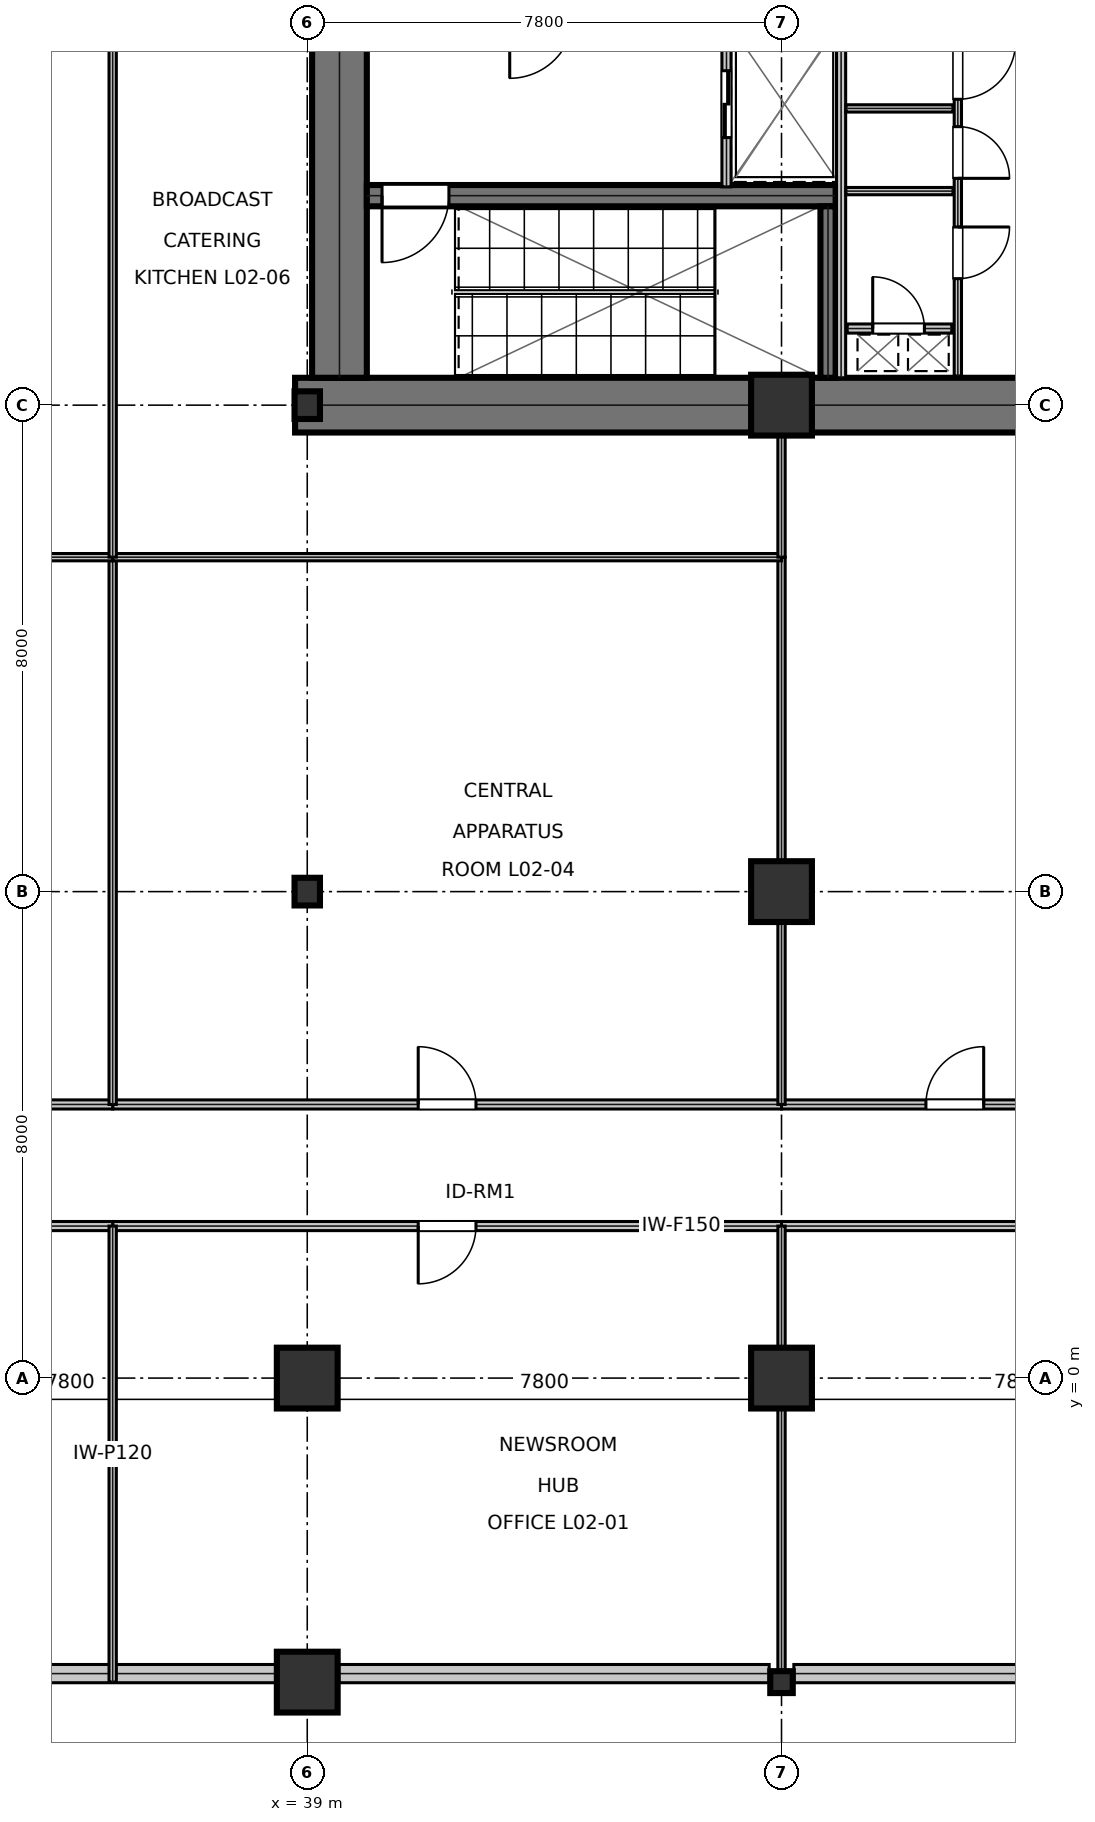
"""IFC4 building model, lengths in metres.
Left out: names, types, materials, properties, quantities, classifications, styles, units other than length and angle.
Written with IfcOpenShell. Run it as: python <this file> out.ifc"""

import sys

from ifc_helpers import new_model, si_unit, direction, frame, frame_2d, origin, origin_2d, place, context, subcontext, project, spatial, rectangle, i_section, extrude, element, fill, save


model = new_model("IFC4")
c1 = context("Model", 3, precision=1e-05, world=origin(), true_north=direction((0.0, 1.0)))
c2 = subcontext(c1, "Body", "Model", "MODEL_VIEW")
j1 = project(units=[si_unit("LENGTHUNIT", "METRE"), si_unit("PLANEANGLEUNIT", "RADIAN")], contexts=[c1])
p1 = place(None, origin())
s1 = spatial("IfcSite", under=j1, at=p1, CompositionType="ELEMENT")
p2 = place(p1, origin())
s2 = spatial("IfcBuilding", under=s1, at=p2, CompositionType="ELEMENT")
p3 = place(p2, frame((0.0, 0.0, 10.8)))
s3 = spatial("IfcBuildingStorey", under=s2, at=p3, CompositionType="ELEMENT", Elevation=10.8)
p4 = place(p3, frame((38.8, 16.0, 0.0), z_axis=(0.0, 0.0, 1.0), x_axis=(1.0, 0.0, 0.0)))
e1 = element("IfcWall", 1, at=p4, inside=s3, PredefinedType="SHEAR", context=c2, shape_type="SweptSolid", body=[
    extrude(rectangle(XDim=16.0, YDim=0.9, at=frame_2d((8.0, 0.0))), origin(), (0.0, 0.0, 1.0), 5.12),
])
p5 = place(p3, frame((39.53, 16.45, 0.0), z_axis=(0.0, 0.0, 1.0), x_axis=(0.0, 1.0, 0.0)))
e2 = element("IfcWall", 2, at=p5, inside=s3, PredefinedType="SHEAR", context=c2, shape_type="SweptSolid", body=[
    extrude(rectangle(XDim=6.15, YDim=0.9, at=frame_2d((3.075, 0.0))), origin(), (0.0, 0.0, 1.0), 5.12),
])
p6 = place(p3, frame((39.98, 19.445, 0.0), z_axis=(0.0, 0.0, 1.0), x_axis=(1.0, 0.0, 0.0)))
e3 = element("IfcWall", 3, at=p6, inside=s3, PredefinedType="SHEAR", context=c2, shape_type="SweptSolid", body=[
    extrude(rectangle(XDim=7.71, YDim=0.35, at=frame_2d((3.855, 0.0))), origin(), (0.0, 0.0, 1.0), 5.12),
])
p7 = place(p6, frame((0.25, 0.0, 0.0)))
e4 = element("IfcOpeningElement", 4, at=p7, cuts=e3, PredefinedType="OPENING", context=c2, shape_type="SweptSolid", body=[
    extrude(rectangle(XDim=1.1, YDim=2.15, at=frame_2d((0.55, 1.075))), frame((0.0, 0.185, 0.0), z_axis=(0.0, -1.0, 0.0), x_axis=(1.0, 0.0, 0.0)), (0.0, 0.0, 1.0), 0.37),
])
p8 = place(p3, frame((47.565, 16.45, 0.0), z_axis=(0.0, 0.0, 1.0), x_axis=(0.0, 1.0, 0.0)))
e5 = element("IfcWall", 5, at=p8, inside=s3, PredefinedType="SHEAR", context=c2, shape_type="SweptSolid", body=[
    extrude(rectangle(XDim=2.82, YDim=0.25, at=frame_2d((1.41, 0.0))), origin(), (0.0, 0.0, 1.0), 5.12),
])
for number, where, z_axis, x_axis in (
    (6, (39.0, -5.0, 0.0), (0.0, 0.0, 1.0), (1.0, 0.0, 0.0)),
    (7, (39.0, 0.0, 0.0), (0.0, 0.0, 1.0), (1.0, 0.0, 0.0)),
):
    element("IfcColumn", number, at=place(p3, frame(where, z_axis=z_axis, x_axis=x_axis)), inside=s3, PredefinedType="COLUMN", context=c2, shape_type="SweptSolid", body=[
        extrude(rectangle(XDim=1.0, YDim=1.0, at=origin_2d()), origin(), (0.0, 0.0, 1.0), 5.395),
    ])
for number, where, z_axis, x_axis in (
    (8, (39.0, 8.0, 0.0), (0.0, 0.0, 1.0), (1.0, 0.0, 0.0)),
    (9, (39.0, 16.0, 0.0), (0.0, 0.0, 1.0), (1.0, 0.0, 0.0)),
):
    element("IfcColumn", number, at=place(p3, frame(where, z_axis=z_axis, x_axis=x_axis)), inside=s3, PredefinedType="COLUMN", context=c2, shape_type="SweptSolid", body=[
        extrude(i_section(OverallWidth=0.418, OverallDepth=0.455, WebThickness=0.042, FlangeThickness=0.068, at=origin_2d()), origin(), (0.0, 0.0, 1.0), 5.395),
    ])
p9 = place(p3, frame((46.8, -5.0, 0.0), z_axis=(0.0, 0.0, 1.0), x_axis=(1.0, 0.0, 0.0)))
e10 = element("IfcColumn", 10, at=p9, inside=s3, PredefinedType="COLUMN", context=c2, shape_type="SweptSolid", body=[
    extrude(i_section(OverallWidth=0.37, OverallDepth=0.36, WebThickness=0.012, FlangeThickness=0.02, at=origin_2d()), origin(), (0.0, 0.0, 1.0), 5.395),
])
for number, where, z_axis, x_axis in (
    (11, (46.8, 0.0, 0.0), (0.0, 0.0, 1.0), (1.0, 0.0, 0.0)),
    (12, (46.8, 8.0, 0.0), (0.0, 0.0, 1.0), (1.0, 0.0, 0.0)),
    (13, (46.8, 16.0, 0.0), (0.0, 0.0, 1.0), (1.0, 0.0, 0.0)),
):
    element("IfcColumn", number, at=place(p3, frame(where, z_axis=z_axis, x_axis=x_axis)), inside=s3, PredefinedType="COLUMN", context=c2, shape_type="SweptSolid", body=[
        extrude(rectangle(XDim=1.0, YDim=1.0, at=origin_2d()), origin(), (0.0, 0.0, 1.0), 5.395),
    ])
p10 = place(p3, frame((31.718, -4.86, 0.0), z_axis=(0.0, 0.0, 1.0), x_axis=(1.0, 0.0, 0.0)))
e14 = element("IfcWall", 14, at=p10, inside=s3, PredefinedType="STANDARD", context=c2, shape_type="SweptSolid", body=[
    extrude(rectangle(XDim=6.764, YDim=0.3, at=frame_2d((3.382, 0.0))), origin(), (0.0, 0.0, 1.0), 4.648),
])
p11 = place(p3, frame((39.518, -4.86, 0.0), z_axis=(0.0, 0.0, 1.0), x_axis=(1.0, 0.0, 0.0)))
e15 = element("IfcWall", 15, at=p11, inside=s3, PredefinedType="STANDARD", context=c2, shape_type="SweptSolid", body=[
    extrude(rectangle(XDim=7.079, YDim=0.3, at=frame_2d((3.54, 0.0))), origin(), (0.0, 0.0, 1.0), 4.648),
])
p12 = place(p3, frame((47.003, -4.86, 0.0), z_axis=(0.0, 0.0, 1.0), x_axis=(1.0, 0.0, 0.0)))
e16 = element("IfcWall", 16, at=p12, inside=s3, PredefinedType="STANDARD", context=c2, shape_type="SweptSolid", body=[
    extrude(rectangle(XDim=7.079, YDim=0.3, at=frame_2d((3.54, 0.0))), origin(), (0.0, 0.0, 1.0), 4.648),
])
p13 = place(p3, frame((45.895, 19.59, 0.0), z_axis=(0.0, 0.0, 1.0), x_axis=(0.0, 1.0, 0.0)))
e17 = element("IfcWall", 17, at=p13, inside=s3, PredefinedType="PARTITIONING", context=c2, shape_type="SweptSolid", body=[
    extrude(rectangle(XDim=2.72, YDim=0.15, at=frame_2d((1.36, 0.0))), origin(), (0.0, 0.0, 1.0), 5.12),
])
p14 = place(p13, frame((0.81, 0.0, 0.0)))
e18 = element("IfcOpeningElement", 18, at=p14, cuts=e17, PredefinedType="OPENING", context=c2, shape_type="SweptSolid", body=[
    extrude(rectangle(XDim=1.1, YDim=2.15, at=frame_2d((0.55, 1.075))), frame((0.0, 0.085, 0.0), z_axis=(0.0, -1.0, 0.0), x_axis=(1.0, 0.0, 0.0)), (0.0, 0.0, 1.0), 0.17),
])
p15 = place(p3, frame((47.88, 17.26, 0.0), z_axis=(0.0, 0.0, 1.0), x_axis=(1.0, 0.0, 0.0)))
e19 = element("IfcWall", 19, at=p15, inside=s3, PredefinedType="PARTITIONING", context=c2, shape_type="SweptSolid", body=[
    extrude(rectangle(XDim=1.72, YDim=0.15, at=frame_2d((0.86, 0.0))), origin(), (0.0, 0.0, 1.0), 5.12),
])
p16 = place(p15, frame((0.42, 0.0, 0.0)))
e20 = element("IfcOpeningElement", 20, at=p16, cuts=e19, PredefinedType="OPENING", context=c2, shape_type="SweptSolid", body=[
    extrude(rectangle(XDim=0.85, YDim=2.15, at=frame_2d((0.425, 1.075))), frame((0.0, 0.085, 0.0), z_axis=(0.0, -1.0, 0.0), x_axis=(1.0, 0.0, 0.0)), (0.0, 0.0, 1.0), 0.17),
])
p17 = place(p3, frame((47.78, 16.45, 0.0), z_axis=(0.0, 0.0, 1.0), x_axis=(0.0, 1.0, 0.0)))
e21 = element("IfcWall", 21, at=p17, inside=s3, PredefinedType="PARTITIONING", context=c2, shape_type="SweptSolid", body=[
    extrude(rectangle(XDim=5.975, YDim=0.15, at=frame_2d((2.988, 0.0))), origin(), (0.0, 0.0, 1.0), 5.12),
])
for number, where, z_axis, x_axis in (
    (22, (47.86, 19.52, 0.0), (0.0, 0.0, 1.0), (1.0, 0.0, 0.0)),
    (23, (47.86, 20.88, 0.0), (0.0, 0.0, 1.0), (1.0, 0.0, 0.0)),
):
    element("IfcWall", number, at=place(p3, frame(where, z_axis=z_axis, x_axis=x_axis)), inside=s3, PredefinedType="PARTITIONING", context=c2, shape_type="SweptSolid", body=[
        extrude(rectangle(XDim=1.76, YDim=0.12, at=frame_2d((0.88, 0.0))), origin(), (0.0, 0.0, 1.0), 5.12),
    ])
p18 = place(p3, frame((49.7, 16.48, 0.0), z_axis=(0.0, 0.0, 1.0), x_axis=(0.0, 1.0, 0.0)))
e24 = element("IfcWall", 24, at=p18, inside=s3, PredefinedType="PARTITIONING", context=c2, shape_type="SweptSolid", body=[
    extrude(rectangle(XDim=5.945, YDim=0.12, at=frame_2d((2.973, 0.0))), origin(), (0.0, 0.0, 1.0), 5.12),
])
p19 = place(p18, frame((1.6, 0.0, 0.0)))
e25 = element("IfcOpeningElement", 25, at=p19, cuts=e24, PredefinedType="OPENING", context=c2, shape_type="SweptSolid", body=[
    extrude(rectangle(XDim=0.85, YDim=2.15, at=frame_2d((0.425, 1.075))), frame((0.0, 0.07, 0.0), z_axis=(0.0, -1.0, 0.0), x_axis=(1.0, 0.0, 0.0)), (0.0, 0.0, 1.0), 0.14),
])
p20 = place(p18, frame((3.25, 0.0, 0.0)))
e26 = element("IfcOpeningElement", 26, at=p20, cuts=e24, PredefinedType="OPENING", context=c2, shape_type="SweptSolid", body=[
    extrude(rectangle(XDim=0.85, YDim=2.15, at=frame_2d((0.425, 1.075))), frame((0.0, 0.07, 0.0), z_axis=(0.0, -1.0, 0.0), x_axis=(1.0, 0.0, 0.0)), (0.0, 0.0, 1.0), 0.14),
])
p21 = place(p18, frame((4.55, 0.0, 0.0)))
e27 = element("IfcOpeningElement", 27, at=p21, cuts=e24, PredefinedType="OPENING", context=c2, shape_type="SweptSolid", body=[
    extrude(rectangle(XDim=0.95, YDim=2.15, at=frame_2d((0.475, 1.075))), frame((0.0, 0.07, 0.0), z_axis=(0.0, -1.0, 0.0), x_axis=(1.0, 0.0, 0.0)), (0.0, 0.0, 1.0), 0.14),
])
p22 = place(p3, frame((35.8, 2.5, 0.0), z_axis=(0.0, 0.0, 1.0), x_axis=(1.0, 0.0, 0.0)))
e28 = element("IfcWall", 28, at=p22, inside=s3, PredefinedType="PARTITIONING", context=c2, shape_type="SweptSolid", body=[
    extrude(rectangle(XDim=11.0, YDim=0.15, at=frame_2d((5.5, 0.0))), origin(), (0.0, 0.0, 1.0), 4.415),
])
p23 = place(p22, frame((5.025, 0.0, 0.0)))
e29 = element("IfcOpeningElement", 29, at=p23, cuts=e28, PredefinedType="OPENING", context=c2, shape_type="SweptSolid", body=[
    extrude(rectangle(XDim=0.95, YDim=2.15, at=frame_2d((0.475, 1.075))), frame((0.0, 0.085, 0.0), z_axis=(0.0, -1.0, 0.0), x_axis=(1.0, 0.0, 0.0)), (0.0, 0.0, 1.0), 0.17),
])
p24 = place(p3, frame((35.8, 4.5, 0.0), z_axis=(0.0, 0.0, 1.0), x_axis=(1.0, 0.0, 0.0)))
e30 = element("IfcWall", 30, at=p24, inside=s3, PredefinedType="PARTITIONING", context=c2, shape_type="SweptSolid", body=[
    extrude(rectangle(XDim=11.0, YDim=0.15, at=frame_2d((5.5, 0.0))), origin(), (0.0, 0.0, 1.0), 4.415),
])
p25 = place(p24, frame((5.025, 0.0, 0.0)))
e31 = element("IfcOpeningElement", 31, at=p25, cuts=e30, PredefinedType="OPENING", context=c2, shape_type="SweptSolid", body=[
    extrude(rectangle(XDim=0.95, YDim=2.15, at=frame_2d((0.475, 1.075))), frame((0.0, 0.085, 0.0), z_axis=(0.0, -1.0, 0.0), x_axis=(1.0, 0.0, 0.0)), (0.0, 0.0, 1.0), 0.17),
])
p26 = place(p3, frame((46.8, 4.5, 0.0), z_axis=(0.0, 0.0, 1.0), x_axis=(1.0, 0.0, 0.0)))
e32 = element("IfcWall", 32, at=p26, inside=s3, PredefinedType="PARTITIONING", context=c2, shape_type="SweptSolid", body=[
    extrude(rectangle(XDim=5.7, YDim=0.15, at=frame_2d((2.85, 0.0))), origin(), (0.0, 0.0, 1.0), 4.415),
])
p27 = place(p26, frame((2.375, 0.0, 0.0)))
e33 = element("IfcOpeningElement", 33, at=p27, cuts=e32, PredefinedType="OPENING", context=c2, shape_type="SweptSolid", body=[
    extrude(rectangle(XDim=0.95, YDim=2.15, at=frame_2d((0.475, 1.075))), frame((0.0, 0.085, 0.0), z_axis=(0.0, -1.0, 0.0), x_axis=(1.0, 0.0, 0.0)), (0.0, 0.0, 1.0), 0.17),
])
p28 = place(p3, frame((26.2, 2.5, 0.0), z_axis=(0.0, 0.0, 1.0), x_axis=(1.0, 0.0, 0.0)))
e34 = element("IfcWall", 34, at=p28, inside=s3, PredefinedType="PARTITIONING", context=c2, shape_type="SweptSolid", body=[
    extrude(rectangle(XDim=9.6, YDim=0.15, at=frame_2d((4.8, 0.0))), origin(), (0.0, 0.0, 1.0), 4.415),
])
p29 = place(p3, frame((28.2, 4.5, 0.0), z_axis=(0.0, 0.0, 1.0), x_axis=(1.0, 0.0, 0.0)))
e35 = element("IfcWall", 35, at=p29, inside=s3, PredefinedType="PARTITIONING", context=c2, shape_type="SweptSolid", body=[
    extrude(rectangle(XDim=7.6, YDim=0.15, at=frame_2d((3.8, 0.0))), origin(), (0.0, 0.0, 1.0), 4.415),
])
p30 = place(p3, frame((46.8, 2.5, 0.0), z_axis=(0.0, 0.0, 1.0), x_axis=(1.0, 0.0, 0.0)))
e36 = element("IfcWall", 36, at=p30, inside=s3, PredefinedType="PARTITIONING", context=c2, shape_type="SweptSolid", body=[
    extrude(rectangle(XDim=5.7, YDim=0.15, at=frame_2d((2.85, 0.0))), origin(), (0.0, 0.0, 1.0), 4.415),
])
for number, where, z_axis, x_axis in (
    (37, (35.8, -5.0, 0.0), (0.0, 0.0, 1.0), (0.0, 1.0, 0.0)),
    (38, (46.8, -5.0, 0.0), (0.0, 0.0, 1.0), (0.0, 1.0, 0.0)),
):
    element("IfcWall", number, at=place(p3, frame(where, z_axis=z_axis, x_axis=x_axis)), inside=s3, PredefinedType="PARTITIONING", context=c2, shape_type="SweptSolid", body=[
        extrude(rectangle(XDim=7.5, YDim=0.12, at=frame_2d((3.75, 0.0))), origin(), (0.0, 0.0, 1.0), 4.338),
    ])
p31 = place(p3, frame((35.8, 4.5, 0.0), z_axis=(0.0, 0.0, 1.0), x_axis=(0.0, 1.0, 0.0)))
e39 = element("IfcWall", 39, at=p31, inside=s3, PredefinedType="PARTITIONING", context=c2, shape_type="SweptSolid", body=[
    extrude(rectangle(XDim=9.0, YDim=0.12, at=frame_2d((4.5, 0.0))), origin(), (0.0, 0.0, 1.0), 4.338),
])
p32 = place(p3, frame((28.2, 13.5, 0.0), z_axis=(0.0, 0.0, 1.0), x_axis=(1.0, 0.0, 0.0)))
e40 = element("IfcWall", 40, at=p32, inside=s3, PredefinedType="PARTITIONING", context=c2, shape_type="SweptSolid", body=[
    extrude(rectangle(XDim=7.6, YDim=0.12, at=frame_2d((3.8, 0.0))), origin(), (0.0, 0.0, 1.0), 3.688),
])
p33 = place(p3, frame((46.8, 4.5, 0.0), z_axis=(0.0, 0.0, 1.0), x_axis=(0.0, 1.0, 0.0)))
e41 = element("IfcWall", 41, at=p33, inside=s3, PredefinedType="PARTITIONING", context=c2, shape_type="SweptSolid", body=[
    extrude(rectangle(XDim=9.0, YDim=0.12, at=frame_2d((4.5, 0.0))), origin(), (0.0, 0.0, 1.0), 4.338),
])
p34 = place(p3, frame((35.8, 13.5, 0.0), z_axis=(0.0, 0.0, 1.0), x_axis=(1.0, 0.0, 0.0)))
e42 = element("IfcWall", 42, at=p34, inside=s3, PredefinedType="PARTITIONING", context=c2, shape_type="SweptSolid", body=[
    extrude(rectangle(XDim=11.0, YDim=0.12, at=frame_2d((5.5, 0.0))), origin(), (0.0, 0.0, 1.0), 4.415),
])
p35 = place(p3, frame((46.8, 13.5, 0.0), z_axis=(0.0, 0.0, 1.0), x_axis=(0.0, 1.0, 0.0)))
e43 = element("IfcWall", 43, at=p35, inside=s3, PredefinedType="PARTITIONING", context=c2, shape_type="SweptSolid", body=[
    extrude(rectangle(XDim=2.1, YDim=0.12, at=frame_2d((1.05, 0.0))), origin(), (0.0, 0.0, 1.0), 4.415),
])
p36 = place(p3, frame((35.8, 13.5, 0.0), z_axis=(0.0, 0.0, 1.0), x_axis=(0.0, 1.0, 0.0)))
e44 = element("IfcWall", 44, at=p36, inside=s3, PredefinedType="PARTITIONING", context=c2, shape_type="SweptSolid", body=[
    extrude(rectangle(XDim=12.7, YDim=0.12, at=frame_2d((6.35, 0.0))), origin(), (0.0, 0.0, 1.0), 3.688),
])
p37 = place(p14, frame((1.1, 0.0, 0.0), z_axis=(0.0, 0.0, 1.0), x_axis=(-1.0, 0.0, 0.0)))
e45 = element("IfcDoor", 45, at=p37, inside=s3, OperationType="DOUBLE_DOOR_SLIDING", PredefinedType="DOOR", context=c2, shape_type="SweptSolid", body=[
    extrude(rectangle(XDim=1.1, YDim=2.15, at=frame_2d((0.55, 1.075))), frame((0.0, 0.025, 0.0), z_axis=(0.0, -1.0, 0.0), x_axis=(1.0, 0.0, 0.0)), (0.0, 0.0, 1.0), 0.05),
])
fill(e18, e45)
p38 = place(p16, origin())
e46 = element("IfcDoor", 46, at=p38, inside=s3, OperationType="SINGLE_SWING_LEFT", PredefinedType="TRAPDOOR", context=c2, shape_type="SweptSolid", body=[
    extrude(rectangle(XDim=0.85, YDim=2.15, at=frame_2d((0.425, 1.075))), frame((0.0, 0.025, 0.0), z_axis=(0.0, -1.0, 0.0), x_axis=(1.0, 0.0, 0.0)), (0.0, 0.0, 1.0), 0.05),
])
fill(e20, e46)
p39 = place(p19, frame((0.85, 0.0, 0.0), z_axis=(0.0, 0.0, 1.0), x_axis=(-1.0, 0.0, 0.0)))
e47 = element("IfcDoor", 47, at=p39, inside=s3, OperationType="SINGLE_SWING_LEFT", PredefinedType="DOOR", context=c2, shape_type="SweptSolid", body=[
    extrude(rectangle(XDim=0.85, YDim=2.15, at=frame_2d((0.425, 1.075))), frame((0.0, 0.025, 0.0), z_axis=(0.0, -1.0, 0.0), x_axis=(1.0, 0.0, 0.0)), (0.0, 0.0, 1.0), 0.05),
])
fill(e25, e47)
p40 = place(p20, frame((0.85, 0.0, 0.0), z_axis=(0.0, 0.0, 1.0), x_axis=(-1.0, 0.0, 0.0)))
e48 = element("IfcDoor", 48, at=p40, inside=s3, OperationType="SINGLE_SWING_RIGHT", PredefinedType="DOOR", context=c2, shape_type="SweptSolid", body=[
    extrude(rectangle(XDim=0.85, YDim=2.15, at=frame_2d((0.425, 1.075))), frame((0.0, 0.025, 0.0), z_axis=(0.0, -1.0, 0.0), x_axis=(1.0, 0.0, 0.0)), (0.0, 0.0, 1.0), 0.05),
])
fill(e26, e48)
p41 = place(p21, frame((0.95, 0.0, 0.0), z_axis=(0.0, 0.0, 1.0), x_axis=(-1.0, 0.0, 0.0)))
e49 = element("IfcDoor", 49, at=p41, inside=s3, OperationType="SINGLE_SWING_LEFT", PredefinedType="DOOR", context=c2, shape_type="SweptSolid", body=[
    extrude(rectangle(XDim=0.95, YDim=2.15, at=frame_2d((0.475, 1.075))), frame((0.0, 0.025, 0.0), z_axis=(0.0, -1.0, 0.0), x_axis=(1.0, 0.0, 0.0)), (0.0, 0.0, 1.0), 0.05),
])
fill(e27, e49)
p42 = place(p23, frame((0.95, 0.0, 0.0), z_axis=(0.0, 0.0, 1.0), x_axis=(-1.0, 0.0, 0.0)))
e50 = element("IfcDoor", 50, at=p42, inside=s3, OperationType="SINGLE_SWING_RIGHT", PredefinedType="DOOR", context=c2, shape_type="SweptSolid", body=[
    extrude(rectangle(XDim=0.95, YDim=2.15, at=frame_2d((0.475, 1.075))), frame((0.0, 0.025, 0.0), z_axis=(0.0, -1.0, 0.0), x_axis=(1.0, 0.0, 0.0)), (0.0, 0.0, 1.0), 0.05),
])
fill(e29, e50)
p43 = place(p25, origin())
e51 = element("IfcDoor", 51, at=p43, inside=s3, OperationType="SINGLE_SWING_LEFT", PredefinedType="DOOR", context=c2, shape_type="SweptSolid", body=[
    extrude(rectangle(XDim=0.95, YDim=2.15, at=frame_2d((0.475, 1.075))), frame((0.0, 0.025, 0.0), z_axis=(0.0, -1.0, 0.0), x_axis=(1.0, 0.0, 0.0)), (0.0, 0.0, 1.0), 0.05),
])
fill(e31, e51)
p44 = place(p27, origin())
e52 = element("IfcDoor", 52, at=p44, inside=s3, OperationType="SINGLE_SWING_RIGHT", PredefinedType="DOOR", context=c2, shape_type="SweptSolid", body=[
    extrude(rectangle(XDim=0.95, YDim=2.15, at=frame_2d((0.475, 1.075))), frame((0.0, 0.025, 0.0), z_axis=(0.0, -1.0, 0.0), x_axis=(1.0, 0.0, 0.0)), (0.0, 0.0, 1.0), 0.05),
])
fill(e33, e52)
p45 = place(p7, frame((1.1, 0.0, 0.0), z_axis=(0.0, 0.0, 1.0), x_axis=(-1.0, 0.0, 0.0)))
e53 = element("IfcDoor", 53, at=p45, inside=s3, OperationType="SINGLE_SWING_RIGHT", PredefinedType="DOOR", context=c2, shape_type="SweptSolid", body=[
    extrude(rectangle(XDim=1.1, YDim=2.15, at=frame_2d((0.55, 1.075))), frame((0.0, 0.025, 0.0), z_axis=(0.0, -1.0, 0.0), x_axis=(1.0, 0.0, 0.0)), (0.0, 0.0, 1.0), 0.05),
])
fill(e4, e53)
save(model, sys.argv[1])
